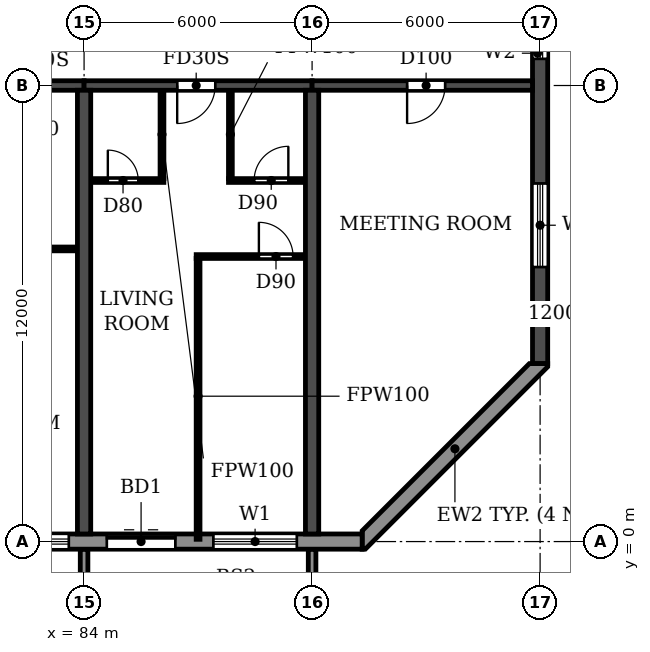
"""IFC4 building model, lengths in metres.
Left out: names, types, materials, properties, quantities, classifications, styles, units other than length and angle.
Written with IfcOpenShell. Run it as: python <this file> out.ifc"""

import sys

from ifc_helpers import new_model, si_unit, direction, frame, frame_2d, origin, place, context, subcontext, project, spatial, polyline, rectangle, outline, extrude, source, transform, mapped, element, fill, save


model = new_model("IFC4")
c1 = context("Model", 3, precision=1e-05, world=origin(), true_north=direction((0.0, 1.0)))
c2 = subcontext(c1, "Body", "Model", "MODEL_VIEW")
j1 = project(units=[si_unit("LENGTHUNIT", "METRE"), si_unit("PLANEANGLEUNIT", "RADIAN")], contexts=[c1])
p1 = place(None, origin())
s1 = spatial("IfcSite", under=j1, at=p1, CompositionType="ELEMENT")
p2 = place(p1, origin())
s2 = spatial("IfcBuilding", under=s1, at=p2, CompositionType="ELEMENT")
p3 = place(p2, frame((0.0, 0.0, 92.7)))
s3 = spatial("IfcBuildingStorey", under=s2, at=p3, CompositionType="ELEMENT", Elevation=92.7)
for number, where, z_axis, x_axis in (
    (1, (84.0, 0.2, 0.0), (0.0, 0.0, 1.0), (0.0, 1.0, 0.0)),
    (2, (90.0, 0.2, 0.0), (0.0, 0.0, 1.0), (0.0, 1.0, 0.0)),
):
    element("IfcWall", number, at=place(p3, frame(where, z_axis=z_axis, x_axis=x_axis)), inside=s3, PredefinedType="SHEAR", context=c2, shape_type="SweptSolid", body=[
        extrude(rectangle(XDim=11.675, YDim=0.35, at=frame_2d((5.837, 0.0))), origin(), (0.0, 0.0, 1.0), 3.06),
    ])
p4 = place(p3, frame((96.0, 4.683, 0.0), z_axis=(0.0, 0.0, 1.0), x_axis=(0.0, 1.0, 0.0)))
e3 = element("IfcWall", 3, at=p4, inside=s3, PredefinedType="SHEAR", context=c2, shape_type="SweptSolid", body=[
    extrude(rectangle(XDim=34.234, YDim=0.4, at=frame_2d((17.117, 0.0))), origin(), (0.0, 0.0, 1.0), 3.06),
])
p5 = place(p4, frame((15.917, 0.0, 0.9)))
e4 = element("IfcOpeningElement", 4, at=p5, cuts=e3, PredefinedType="OPENING", context=c2, shape_type="SweptSolid", body=[
    extrude(rectangle(XDim=1.2, YDim=1.5, at=frame_2d((0.6, 0.75))), frame((0.0, 0.21, 0.0), z_axis=(0.0, -1.0, 0.0), x_axis=(1.0, 0.0, 0.0)), (0.0, 0.0, 1.0), 0.42),
])
p6 = place(p4, frame((23.817, 0.0, 0.9)))
e5 = element("IfcOpeningElement", 5, at=p6, cuts=e3, PredefinedType="OPENING", context=c2, shape_type="SweptSolid", body=[
    extrude(rectangle(XDim=1.2, YDim=1.5, at=frame_2d((0.6, 0.75))), frame((0.0, 0.21, 0.0), z_axis=(0.0, -1.0, 0.0), x_axis=(1.0, 0.0, 0.0)), (0.0, 0.0, 1.0), 0.42),
])
p7 = place(p4, frame((8.017, 0.0, 0.9)))
e6 = element("IfcOpeningElement", 6, at=p7, cuts=e3, PredefinedType="OPENING", context=c2, shape_type="SweptSolid", body=[
    extrude(rectangle(XDim=1.2, YDim=1.5, at=frame_2d((0.6, 0.75))), frame((0.0, 0.21, 0.0), z_axis=(0.0, -1.0, 0.0), x_axis=(1.0, 0.0, 0.0)), (0.0, 0.0, 1.0), 0.42),
])
p8 = place(p4, frame((28.894, 0.0, 0.6)))
e7 = element("IfcOpeningElement", 7, at=p8, cuts=e3, PredefinedType="OPENING", context=c2, shape_type="SweptSolid", body=[
    extrude(rectangle(XDim=2.2, YDim=1.8, at=frame_2d((1.1, 0.9))), frame((0.0, 0.21, 0.0), z_axis=(0.0, -1.0, 0.0), x_axis=(1.0, 0.0, 0.0)), (0.0, 0.0, 1.0), 0.42),
])
p9 = place(p4, frame((2.541, 0.0, 0.6)))
e8 = element("IfcOpeningElement", 8, at=p9, cuts=e3, PredefinedType="OPENING", context=c2, shape_type="SweptSolid", body=[
    extrude(rectangle(XDim=2.2, YDim=1.8, at=frame_2d((1.1, 0.9))), frame((0.0, 0.21, 0.0), z_axis=(0.0, -1.0, 0.0), x_axis=(1.0, 0.0, 0.0)), (0.0, 0.0, 1.0), 0.42),
])
p10 = place(p3, frame((78.0, 12.0, 0.0), z_axis=(0.0, 0.0, 1.0), x_axis=(1.0, 0.0, 0.0)))
e9 = element("IfcWall", 9, at=p10, inside=s3, PredefinedType="SHEAR", context=c2, shape_type="SweptSolid", body=[
    extrude(rectangle(XDim=6.0, YDim=0.25, at=frame_2d((3.0, 0.0))), origin(), (0.0, 0.0, 1.0), 2.46),
])
p11 = place(p10, frame((2.45, 0.0, 0.0)))
e10 = element("IfcOpeningElement", 10, at=p11, cuts=e9, PredefinedType="OPENING", context=c2, shape_type="SweptSolid", body=[
    extrude(rectangle(XDim=1.0, YDim=2.1, at=frame_2d((0.5, 1.05))), frame((0.0, 0.135, 0.0), z_axis=(0.0, -1.0, 0.0), x_axis=(1.0, 0.0, 0.0)), (0.0, 0.0, 1.0), 0.27),
])
p12 = place(p3, frame((84.0, 12.0, 0.0), z_axis=(0.0, 0.0, 1.0), x_axis=(1.0, 0.0, 0.0)))
e11 = element("IfcWall", 11, at=p12, inside=s3, PredefinedType="SHEAR", context=c2, shape_type="SweptSolid", body=[
    extrude(rectangle(XDim=6.0, YDim=0.25, at=frame_2d((3.0, 0.0))), origin(), (0.0, 0.0, 1.0), 2.46),
])
p13 = place(p12, frame((2.45, 0.0, 0.0)))
e12 = element("IfcOpeningElement", 12, at=p13, cuts=e11, PredefinedType="OPENING", context=c2, shape_type="SweptSolid", body=[
    extrude(rectangle(XDim=1.0, YDim=2.1, at=frame_2d((0.5, 1.05))), frame((0.0, 0.135, 0.0), z_axis=(0.0, -1.0, 0.0), x_axis=(1.0, 0.0, 0.0)), (0.0, 0.0, 1.0), 0.27),
])
p14 = place(p3, frame((90.0, 12.0, 0.0), z_axis=(0.0, 0.0, 1.0), x_axis=(1.0, 0.0, 0.0)))
e13 = element("IfcWall", 13, at=p14, inside=s3, PredefinedType="SHEAR", context=c2, shape_type="SweptSolid", body=[
    extrude(rectangle(XDim=5.8, YDim=0.25, at=frame_2d((2.9, 0.0))), origin(), (0.0, 0.0, 1.0), 2.46),
])
p15 = place(p14, frame((2.5, 0.0, 0.0)))
e14 = element("IfcOpeningElement", 14, at=p15, cuts=e13, PredefinedType="OPENING", context=c2, shape_type="SweptSolid", body=[
    extrude(rectangle(XDim=1.0, YDim=2.1, at=frame_2d((0.5, 1.05))), frame((0.0, 0.135, 0.0), z_axis=(0.0, -1.0, 0.0), x_axis=(1.0, 0.0, 0.0)), (0.0, 0.0, 1.0), 0.27),
])
p16 = place(p3, frame((10.683, 0.0, 0.0), z_axis=(0.0, 0.0, 1.0), x_axis=(1.0, 0.0, 0.0)))
e15 = element("IfcWall", 15, at=p16, inside=s3, PredefinedType="STANDARD", context=c2, shape_type="SweptSolid", body=[
    extrude(rectangle(XDim=80.634, YDim=0.4, at=frame_2d((40.317, 0.0))), origin(), (0.0, 0.0, 1.0), 3.06),
])
p17 = place(p16, frame((1.717, 0.0, 0.9)))
e16 = element("IfcOpeningElement", 16, at=p17, cuts=e15, PredefinedType="OPENING", context=c2, shape_type="SweptSolid", body=[
    extrude(rectangle(XDim=2.2, YDim=1.5, at=frame_2d((1.1, 0.75))), frame((0.0, 0.21, 0.0), z_axis=(0.0, -1.0, 0.0), x_axis=(1.0, 0.0, 0.0)), (0.0, 0.0, 1.0), 0.42),
])
p18 = place(p16, frame((4.917, 0.0, 0.0)))
e17 = element("IfcOpeningElement", 17, at=p18, cuts=e15, PredefinedType="OPENING", context=c2, shape_type="SweptSolid", body=[
    extrude(rectangle(XDim=1.8, YDim=2.4, at=frame_2d((0.9, 1.2))), frame((0.0, 0.21, 0.0), z_axis=(0.0, -1.0, 0.0), x_axis=(1.0, 0.0, 0.0)), (0.0, 0.0, 1.0), 0.42),
])
p19 = place(p16, frame((7.717, 0.0, 0.9)))
e18 = element("IfcOpeningElement", 18, at=p19, cuts=e15, PredefinedType="OPENING", context=c2, shape_type="SweptSolid", body=[
    extrude(rectangle(XDim=2.2, YDim=1.5, at=frame_2d((1.1, 0.75))), frame((0.0, 0.21, 0.0), z_axis=(0.0, -1.0, 0.0), x_axis=(1.0, 0.0, 0.0)), (0.0, 0.0, 1.0), 0.42),
])
p20 = place(p16, frame((10.717, 0.0, 0.9)))
e19 = element("IfcOpeningElement", 19, at=p20, cuts=e15, PredefinedType="OPENING", context=c2, shape_type="SweptSolid", body=[
    extrude(rectangle(XDim=2.2, YDim=1.5, at=frame_2d((1.1, 0.75))), frame((0.0, 0.21, 0.0), z_axis=(0.0, -1.0, 0.0), x_axis=(1.0, 0.0, 0.0)), (0.0, 0.0, 1.0), 0.42),
])
p21 = place(p16, frame((13.717, 0.0, 0.9)))
e20 = element("IfcOpeningElement", 20, at=p21, cuts=e15, PredefinedType="OPENING", context=c2, shape_type="SweptSolid", body=[
    extrude(rectangle(XDim=2.2, YDim=1.5, at=frame_2d((1.1, 0.75))), frame((0.0, 0.21, 0.0), z_axis=(0.0, -1.0, 0.0), x_axis=(1.0, 0.0, 0.0)), (0.0, 0.0, 1.0), 0.42),
])
p22 = place(p16, frame((16.717, 0.0, 0.9)))
e21 = element("IfcOpeningElement", 21, at=p22, cuts=e15, PredefinedType="OPENING", context=c2, shape_type="SweptSolid", body=[
    extrude(rectangle(XDim=2.2, YDim=1.5, at=frame_2d((1.1, 0.75))), frame((0.0, 0.21, 0.0), z_axis=(0.0, -1.0, 0.0), x_axis=(1.0, 0.0, 0.0)), (0.0, 0.0, 1.0), 0.42),
])
p23 = place(p16, frame((19.717, 0.0, 0.9)))
e22 = element("IfcOpeningElement", 22, at=p23, cuts=e15, PredefinedType="OPENING", context=c2, shape_type="SweptSolid", body=[
    extrude(rectangle(XDim=2.2, YDim=1.5, at=frame_2d((1.1, 0.75))), frame((0.0, 0.21, 0.0), z_axis=(0.0, -1.0, 0.0), x_axis=(1.0, 0.0, 0.0)), (0.0, 0.0, 1.0), 0.42),
])
p24 = place(p16, frame((22.717, 0.0, 0.9)))
e23 = element("IfcOpeningElement", 23, at=p24, cuts=e15, PredefinedType="OPENING", context=c2, shape_type="SweptSolid", body=[
    extrude(rectangle(XDim=2.2, YDim=1.5, at=frame_2d((1.1, 0.75))), frame((0.0, 0.21, 0.0), z_axis=(0.0, -1.0, 0.0), x_axis=(1.0, 0.0, 0.0)), (0.0, 0.0, 1.0), 0.42),
])
p25 = place(p16, frame((25.717, 0.0, 0.9)))
e24 = element("IfcOpeningElement", 24, at=p25, cuts=e15, PredefinedType="OPENING", context=c2, shape_type="SweptSolid", body=[
    extrude(rectangle(XDim=2.2, YDim=1.5, at=frame_2d((1.1, 0.75))), frame((0.0, 0.21, 0.0), z_axis=(0.0, -1.0, 0.0), x_axis=(1.0, 0.0, 0.0)), (0.0, 0.0, 1.0), 0.42),
])
p26 = place(p16, frame((28.917, 0.0, 0.0)))
e25 = element("IfcOpeningElement", 25, at=p26, cuts=e15, PredefinedType="OPENING", context=c2, shape_type="SweptSolid", body=[
    extrude(rectangle(XDim=1.8, YDim=2.4, at=frame_2d((0.9, 1.2))), frame((0.0, 0.21, 0.0), z_axis=(0.0, -1.0, 0.0), x_axis=(1.0, 0.0, 0.0)), (0.0, 0.0, 1.0), 0.42),
])
p27 = place(p16, frame((31.717, 0.0, 0.9)))
e26 = element("IfcOpeningElement", 26, at=p27, cuts=e15, PredefinedType="OPENING", context=c2, shape_type="SweptSolid", body=[
    extrude(rectangle(XDim=2.2, YDim=1.5, at=frame_2d((1.1, 0.75))), frame((0.0, 0.21, 0.0), z_axis=(0.0, -1.0, 0.0), x_axis=(1.0, 0.0, 0.0)), (0.0, 0.0, 1.0), 0.42),
])
p28 = place(p16, frame((34.717, 0.0, 0.9)))
e27 = element("IfcOpeningElement", 27, at=p28, cuts=e15, PredefinedType="OPENING", context=c2, shape_type="SweptSolid", body=[
    extrude(rectangle(XDim=2.2, YDim=1.5, at=frame_2d((1.1, 0.75))), frame((0.0, 0.21, 0.0), z_axis=(0.0, -1.0, 0.0), x_axis=(1.0, 0.0, 0.0)), (0.0, 0.0, 1.0), 0.42),
])
p29 = place(p16, frame((37.917, 0.0, 0.0)))
e28 = element("IfcOpeningElement", 28, at=p29, cuts=e15, PredefinedType="OPENING", context=c2, shape_type="SweptSolid", body=[
    extrude(rectangle(XDim=1.8, YDim=2.4, at=frame_2d((0.9, 1.2))), frame((0.0, 0.21, 0.0), z_axis=(0.0, -1.0, 0.0), x_axis=(1.0, 0.0, 0.0)), (0.0, 0.0, 1.0), 0.42),
])
p30 = place(p16, frame((40.717, 0.0, 0.9)))
e29 = element("IfcOpeningElement", 29, at=p30, cuts=e15, PredefinedType="OPENING", context=c2, shape_type="SweptSolid", body=[
    extrude(rectangle(XDim=2.2, YDim=1.5, at=frame_2d((1.1, 0.75))), frame((0.0, 0.21, 0.0), z_axis=(0.0, -1.0, 0.0), x_axis=(1.0, 0.0, 0.0)), (0.0, 0.0, 1.0), 0.42),
])
p31 = place(p16, frame((43.717, 0.0, 0.9)))
e30 = element("IfcOpeningElement", 30, at=p31, cuts=e15, PredefinedType="OPENING", context=c2, shape_type="SweptSolid", body=[
    extrude(rectangle(XDim=2.2, YDim=1.5, at=frame_2d((1.1, 0.75))), frame((0.0, 0.21, 0.0), z_axis=(0.0, -1.0, 0.0), x_axis=(1.0, 0.0, 0.0)), (0.0, 0.0, 1.0), 0.42),
])
p32 = place(p16, frame((46.717, 0.0, 0.9)))
e31 = element("IfcOpeningElement", 31, at=p32, cuts=e15, PredefinedType="OPENING", context=c2, shape_type="SweptSolid", body=[
    extrude(rectangle(XDim=2.2, YDim=1.5, at=frame_2d((1.1, 0.75))), frame((0.0, 0.21, 0.0), z_axis=(0.0, -1.0, 0.0), x_axis=(1.0, 0.0, 0.0)), (0.0, 0.0, 1.0), 0.42),
])
p33 = place(p16, frame((49.717, 0.0, 0.9)))
e32 = element("IfcOpeningElement", 32, at=p33, cuts=e15, PredefinedType="OPENING", context=c2, shape_type="SweptSolid", body=[
    extrude(rectangle(XDim=2.2, YDim=1.5, at=frame_2d((1.1, 0.75))), frame((0.0, 0.21, 0.0), z_axis=(0.0, -1.0, 0.0), x_axis=(1.0, 0.0, 0.0)), (0.0, 0.0, 1.0), 0.42),
])
p34 = place(p16, frame((52.917, 0.0, 0.0)))
e33 = element("IfcOpeningElement", 33, at=p34, cuts=e15, PredefinedType="OPENING", context=c2, shape_type="SweptSolid", body=[
    extrude(rectangle(XDim=1.8, YDim=2.4, at=frame_2d((0.9, 1.2))), frame((0.0, 0.21, 0.0), z_axis=(0.0, -1.0, 0.0), x_axis=(1.0, 0.0, 0.0)), (0.0, 0.0, 1.0), 0.42),
])
p35 = place(p16, frame((55.717, 0.0, 0.9)))
e34 = element("IfcOpeningElement", 34, at=p35, cuts=e15, PredefinedType="OPENING", context=c2, shape_type="SweptSolid", body=[
    extrude(rectangle(XDim=2.2, YDim=1.5, at=frame_2d((1.1, 0.75))), frame((0.0, 0.21, 0.0), z_axis=(0.0, -1.0, 0.0), x_axis=(1.0, 0.0, 0.0)), (0.0, 0.0, 1.0), 0.42),
])
p36 = place(p16, frame((58.717, 0.0, 0.9)))
e35 = element("IfcOpeningElement", 35, at=p36, cuts=e15, PredefinedType="OPENING", context=c2, shape_type="SweptSolid", body=[
    extrude(rectangle(XDim=2.2, YDim=1.5, at=frame_2d((1.1, 0.75))), frame((0.0, 0.21, 0.0), z_axis=(0.0, -1.0, 0.0), x_axis=(1.0, 0.0, 0.0)), (0.0, 0.0, 1.0), 0.42),
])
p37 = place(p16, frame((61.717, 0.0, 0.9)))
e36 = element("IfcOpeningElement", 36, at=p37, cuts=e15, PredefinedType="OPENING", context=c2, shape_type="SweptSolid", body=[
    extrude(rectangle(XDim=2.2, YDim=1.5, at=frame_2d((1.1, 0.75))), frame((0.0, 0.21, 0.0), z_axis=(0.0, -1.0, 0.0), x_axis=(1.0, 0.0, 0.0)), (0.0, 0.0, 1.0), 0.42),
])
p38 = place(p16, frame((64.917, 0.0, 0.0)))
e37 = element("IfcOpeningElement", 37, at=p38, cuts=e15, PredefinedType="OPENING", context=c2, shape_type="SweptSolid", body=[
    extrude(rectangle(XDim=1.8, YDim=2.4, at=frame_2d((0.9, 1.2))), frame((0.0, 0.21, 0.0), z_axis=(0.0, -1.0, 0.0), x_axis=(1.0, 0.0, 0.0)), (0.0, 0.0, 1.0), 0.42),
])
p39 = place(p16, frame((67.717, 0.0, 0.9)))
e38 = element("IfcOpeningElement", 38, at=p39, cuts=e15, PredefinedType="OPENING", context=c2, shape_type="SweptSolid", body=[
    extrude(rectangle(XDim=2.2, YDim=1.5, at=frame_2d((1.1, 0.75))), frame((0.0, 0.21, 0.0), z_axis=(0.0, -1.0, 0.0), x_axis=(1.0, 0.0, 0.0)), (0.0, 0.0, 1.0), 0.42),
])
p40 = place(p16, frame((70.717, 0.0, 0.9)))
e39 = element("IfcOpeningElement", 39, at=p40, cuts=e15, PredefinedType="OPENING", context=c2, shape_type="SweptSolid", body=[
    extrude(rectangle(XDim=2.2, YDim=1.5, at=frame_2d((1.1, 0.75))), frame((0.0, 0.21, 0.0), z_axis=(0.0, -1.0, 0.0), x_axis=(1.0, 0.0, 0.0)), (0.0, 0.0, 1.0), 0.42),
])
p41 = place(p16, frame((73.917, 0.0, 0.0)))
e40 = element("IfcOpeningElement", 40, at=p41, cuts=e15, PredefinedType="OPENING", context=c2, shape_type="SweptSolid", body=[
    extrude(rectangle(XDim=1.8, YDim=2.4, at=frame_2d((0.9, 1.2))), frame((0.0, 0.21, 0.0), z_axis=(0.0, -1.0, 0.0), x_axis=(1.0, 0.0, 0.0)), (0.0, 0.0, 1.0), 0.42),
])
p42 = place(p16, frame((76.717, 0.0, 0.9)))
e41 = element("IfcOpeningElement", 41, at=p42, cuts=e15, PredefinedType="OPENING", context=c2, shape_type="SweptSolid", body=[
    extrude(rectangle(XDim=2.2, YDim=1.5, at=frame_2d((1.1, 0.75))), frame((0.0, 0.21, 0.0), z_axis=(0.0, -1.0, 0.0), x_axis=(1.0, 0.0, 0.0)), (0.0, 0.0, 1.0), 0.42),
])
p43 = place(p3, origin())
e42 = element("IfcWall", 42, at=p43, inside=s3, PredefinedType="STANDARD", context=c2, shape_type="SweptSolid", body=[
    extrude(outline(polyline([(91.317, -0.2), (91.4, -0.2), (96.2, 4.6), (96.2, 4.683), (95.717, 4.683), (91.317, 0.283), (91.317, -0.2)])), origin(), (0.0, 0.0, 1.0), 3.06),
])
m1 = source(origin(), c2, "Body", "SweptSolid", [
    extrude(outline(polyline([(0.0, 0.0), (0.2, 0.0), (0.2, 1.65), (0.0, 1.65), (0.0, 0.0)])), origin(), (0.0, 0.0, 1.0), 3.1),
])
for number, where in (
    (43, (83.9, -1.85, 0.0)),
    (44, (89.9, -1.85, 0.0)),
):
    element("IfcWall", number, at=place(p3, frame(where)), inside=s3, PredefinedType="STANDARD", context=c2, shape_type="MappedRepresentation", body=[
        mapped(m1, transform((0.0, 0.0, 0.0))),
    ])
p44 = place(p3, frame((86.95, 7.5, 0.0), z_axis=(0.0, 0.0, 1.0), x_axis=(1.0, 0.0, 0.0)))
e45 = element("IfcWall", 45, at=p44, inside=s3, PredefinedType="PARTITIONING", context=c2, shape_type="SweptSolid", body=[
    extrude(rectangle(XDim=2.865, YDim=0.1, at=frame_2d((1.433, 0.0))), origin(), (0.0, 0.0, 1.0), 3.06),
])
p45 = place(p44, frame((1.65, 0.0, 0.0)))
e46 = element("IfcOpeningElement", 46, at=p45, cuts=e45, PredefinedType="OPENING", context=c2, shape_type="SweptSolid", body=[
    extrude(rectangle(XDim=0.9, YDim=2.1, at=frame_2d((0.45, 1.05))), frame((0.0, 0.06, 0.0), z_axis=(0.0, -1.0, 0.0), x_axis=(1.0, 0.0, 0.0)), (0.0, 0.0, 1.0), 0.12),
])
p46 = place(p3, frame((81.8, 7.7, 0.0), z_axis=(0.0, 0.0, 1.0), x_axis=(1.0, 0.0, 0.0)))
e47 = element("IfcWall", 47, at=p46, inside=s3, PredefinedType="PARTITIONING", context=c2, shape_type="SweptSolid", body=[
    extrude(rectangle(XDim=2.015, YDim=0.1, at=frame_2d((1.007, 0.0))), origin(), (0.0, 0.0, 1.0), 3.06),
])
p47 = place(p3, frame((84.185, 9.5, 0.0), z_axis=(0.0, 0.0, 1.0), x_axis=(1.0, 0.0, 0.0)))
e48 = element("IfcWall", 48, at=p47, inside=s3, PredefinedType="PARTITIONING", context=c2, shape_type="SweptSolid", body=[
    extrude(rectangle(XDim=1.915, YDim=0.1, at=frame_2d((0.958, 0.0))), origin(), (0.0, 0.0, 1.0), 3.06),
])
p48 = place(p47, frame((0.44, 0.0, 0.0)))
e49 = element("IfcOpeningElement", 49, at=p48, cuts=e48, PredefinedType="OPENING", context=c2, shape_type="SweptSolid", body=[
    extrude(rectangle(XDim=0.8, YDim=2.1, at=frame_2d((0.4, 1.05))), frame((0.0, 0.06, 0.0), z_axis=(0.0, -1.0, 0.0), x_axis=(1.0, 0.0, 0.0)), (0.0, 0.0, 1.0), 0.12),
])
p49 = place(p3, frame((87.8, 9.5, 0.0), z_axis=(0.0, 0.0, 1.0), x_axis=(1.0, 0.0, 0.0)))
e50 = element("IfcWall", 50, at=p49, inside=s3, PredefinedType="PARTITIONING", context=c2, shape_type="SweptSolid", body=[
    extrude(rectangle(XDim=2.015, YDim=0.1, at=frame_2d((1.007, 0.0))), origin(), (0.0, 0.0, 1.0), 3.06),
])
p50 = place(p49, frame((0.675, 0.0, 0.0)))
e51 = element("IfcOpeningElement", 51, at=p50, cuts=e50, PredefinedType="OPENING", context=c2, shape_type="SweptSolid", body=[
    extrude(rectangle(XDim=0.9, YDim=2.1, at=frame_2d((0.45, 1.05))), frame((0.0, 0.06, 0.0), z_axis=(0.0, -1.0, 0.0), x_axis=(1.0, 0.0, 0.0)), (0.0, 0.0, 1.0), 0.12),
])
p51 = place(p3, frame((86.05, 9.55, 0.0), z_axis=(0.0, 0.0, 1.0), x_axis=(0.0, 1.0, 0.0)))
e52 = element("IfcWall", 52, at=p51, inside=s3, PredefinedType="PARTITIONING", context=c2, shape_type="SweptSolid", body=[
    extrude(rectangle(XDim=2.315, YDim=0.1, at=frame_2d((1.157, 0.0))), origin(), (0.0, 0.0, 1.0), 3.06),
])
p52 = place(p3, frame((87.0, 0.06, 0.0), z_axis=(0.0, 0.0, 1.0), x_axis=(0.0, 1.0, 0.0)))
e53 = element("IfcWall", 53, at=p52, inside=s3, PredefinedType="PARTITIONING", context=c2, shape_type="SweptSolid", body=[
    extrude(rectangle(XDim=7.39, YDim=0.1, at=frame_2d((3.695, 0.0))), origin(), (0.0, 0.0, 1.0), 3.06),
])
p53 = place(p3, frame((87.85, 9.55, 0.0), z_axis=(0.0, 0.0, 1.0), x_axis=(0.0, 1.0, 0.0)))
e54 = element("IfcWall", 54, at=p53, inside=s3, PredefinedType="PARTITIONING", context=c2, shape_type="SweptSolid", body=[
    extrude(rectangle(XDim=2.315, YDim=0.1, at=frame_2d((1.157, 0.0))), origin(), (0.0, 0.0, 1.0), 3.06),
])
p54 = place(p40, origin())
e55 = element("IfcWindow", 55, at=p54, inside=s3, PartitioningType="DOUBLE_PANEL_HORIZONTAL", PredefinedType="WINDOW", context=c2, shape_type="SweptSolid", body=[
    extrude(rectangle(XDim=2.2, YDim=1.5, at=frame_2d((1.1, 0.75))), frame((0.0, 0.03, 0.0), z_axis=(0.0, -1.0, 0.0), x_axis=(1.0, 0.0, 0.0)), (0.0, 0.0, 1.0), 0.06),
])
fill(e39, e55)
p55 = place(p41, origin())
e56 = element("IfcDoor", 56, at=p55, inside=s3, OperationType="DOUBLE_DOOR_SLIDING", PredefinedType="DOOR", context=c2, shape_type="SweptSolid", body=[
    extrude(rectangle(XDim=1.8, YDim=2.4, at=frame_2d((0.9, 1.2))), frame((0.0, 0.025, 0.0), z_axis=(0.0, -1.0, 0.0), x_axis=(1.0, 0.0, 0.0)), (0.0, 0.0, 1.0), 0.05),
])
fill(e40, e56)
p56 = place(p42, origin())
e57 = element("IfcWindow", 57, at=p56, inside=s3, PartitioningType="DOUBLE_PANEL_HORIZONTAL", PredefinedType="WINDOW", context=c2, shape_type="SweptSolid", body=[
    extrude(rectangle(XDim=2.2, YDim=1.5, at=frame_2d((1.1, 0.75))), frame((0.0, 0.03, 0.0), z_axis=(0.0, -1.0, 0.0), x_axis=(1.0, 0.0, 0.0)), (0.0, 0.0, 1.0), 0.06),
])
fill(e41, e57)
p57 = place(p7, origin())
e58 = element("IfcWindow", 58, at=p57, inside=s3, PartitioningType="SINGLE_PANEL", PredefinedType="WINDOW", context=c2, shape_type="SweptSolid", body=[
    extrude(rectangle(XDim=1.2, YDim=1.5, at=frame_2d((0.6, 0.75))), frame((0.0, 0.03, 0.0), z_axis=(0.0, -1.0, 0.0), x_axis=(1.0, 0.0, 0.0)), (0.0, 0.0, 1.0), 0.06),
])
fill(e6, e58)
p58 = place(p9, origin())
e59 = element("IfcWindow", 59, at=p58, inside=s3, PartitioningType="DOUBLE_PANEL_HORIZONTAL", PredefinedType="WINDOW", context=c2, shape_type="SweptSolid", body=[
    extrude(rectangle(XDim=2.2, YDim=1.8, at=frame_2d((1.1, 0.9))), frame((0.0, 0.03, 0.0), z_axis=(0.0, -1.0, 0.0), x_axis=(1.0, 0.0, 0.0)), (0.0, 0.0, 1.0), 0.06),
])
fill(e8, e59)
p59 = place(p48, origin())
e60 = element("IfcDoor", 60, at=p59, inside=s3, OperationType="SINGLE_SWING_LEFT", PredefinedType="DOOR", context=c2, shape_type="SweptSolid", body=[
    extrude(rectangle(XDim=0.8, YDim=2.1, at=frame_2d((0.4, 1.05))), frame((0.0, 0.025, 0.0), z_axis=(0.0, -1.0, 0.0), x_axis=(1.0, 0.0, 0.0)), (0.0, 0.0, 1.0), 0.05),
])
fill(e49, e60)
p60 = place(p13, frame((1.0, 0.0, 0.0), z_axis=(0.0, 0.0, 1.0), x_axis=(-1.0, 0.0, 0.0)))
e61 = element("IfcDoor", 61, at=p60, inside=s3, OperationType="SINGLE_SWING_RIGHT", PredefinedType="DOOR", context=c2, shape_type="SweptSolid", body=[
    extrude(rectangle(XDim=1.0, YDim=2.1, at=frame_2d((0.5, 1.05))), frame((0.0, 0.025, 0.0), z_axis=(0.0, -1.0, 0.0), x_axis=(1.0, 0.0, 0.0)), (0.0, 0.0, 1.0), 0.05),
])
fill(e12, e61)
p61 = place(p50, origin())
e62 = element("IfcDoor", 62, at=p61, inside=s3, OperationType="SINGLE_SWING_RIGHT", PredefinedType="DOOR", context=c2, shape_type="SweptSolid", body=[
    extrude(rectangle(XDim=0.9, YDim=2.1, at=frame_2d((0.45, 1.05))), frame((0.0, 0.025, 0.0), z_axis=(0.0, -1.0, 0.0), x_axis=(1.0, 0.0, 0.0)), (0.0, 0.0, 1.0), 0.05),
])
fill(e51, e62)
p62 = place(p45, origin())
e63 = element("IfcDoor", 63, at=p62, inside=s3, OperationType="SINGLE_SWING_LEFT", PredefinedType="DOOR", context=c2, shape_type="SweptSolid", body=[
    extrude(rectangle(XDim=0.9, YDim=2.1, at=frame_2d((0.45, 1.05))), frame((0.0, 0.025, 0.0), z_axis=(0.0, -1.0, 0.0), x_axis=(1.0, 0.0, 0.0)), (0.0, 0.0, 1.0), 0.05),
])
fill(e46, e63)
p63 = place(p15, frame((1.0, 0.0, 0.0), z_axis=(0.0, 0.0, 1.0), x_axis=(-1.0, 0.0, 0.0)))
e64 = element("IfcDoor", 64, at=p63, inside=s3, OperationType="SINGLE_SWING_RIGHT", PredefinedType="DOOR", context=c2, shape_type="SweptSolid", body=[
    extrude(rectangle(XDim=1.0, YDim=2.1, at=frame_2d((0.5, 1.05))), frame((0.0, 0.025, 0.0), z_axis=(0.0, -1.0, 0.0), x_axis=(1.0, 0.0, 0.0)), (0.0, 0.0, 1.0), 0.05),
])
fill(e14, e64)
save(model, sys.argv[1])
